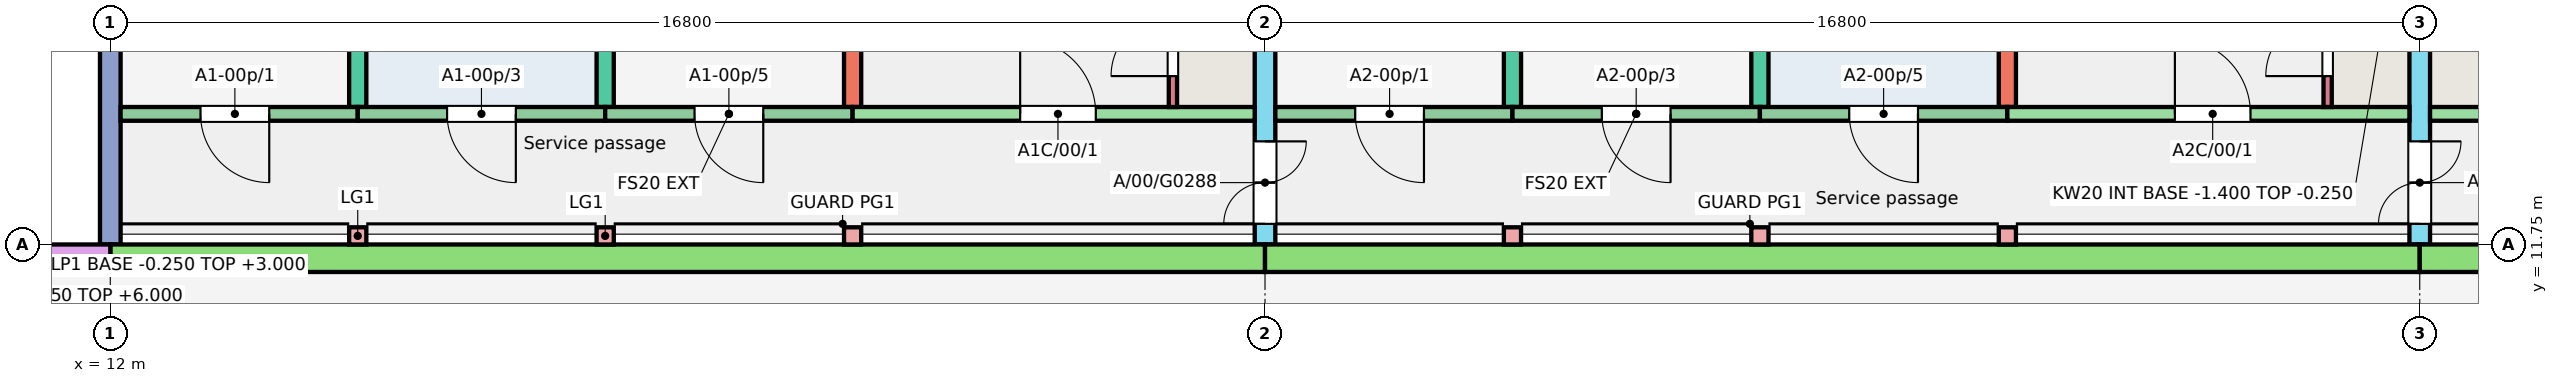
"""IFC4 building model, lengths in metres.
Left out: names, types, materials, properties, quantities, classifications, styles, units other than length and angle.
Written with IfcOpenShell. Run it as: python <this file> out.ifc"""

import sys

from ifc_helpers import new_model, si_unit, direction, frame, frame_2d, origin, origin_2d, place, context, subcontext, project, spatial, rectangle, extrude, element, fill, save


model = new_model("IFC4")
c1 = context("Model", 3, precision=1e-05, world=origin(), true_north=direction((0.0, 1.0)))
c2 = subcontext(c1, "Body", "Model", "MODEL_VIEW")
j1 = project(units=[si_unit("LENGTHUNIT", "METRE"), si_unit("PLANEANGLEUNIT", "RADIAN")], contexts=[c1])
p1 = place(None, origin())
s1 = spatial("IfcSite", under=j1, at=p1, CompositionType="ELEMENT")
p2 = place(p1, origin())
s2 = spatial("IfcBuilding", under=s1, at=p2, CompositionType="ELEMENT")
p3 = place(p2, origin())
s3 = spatial("IfcBuildingStorey", under=s2, at=p3, CompositionType="ELEMENT", Elevation=0.0)
p4 = place(p3, frame((12.0, 11.75, -0.25), z_axis=(0.0, 0.0, 1.0), x_axis=(0.0, 1.0, 0.0)))
e1 = element("IfcWall", 1, at=p4, inside=s3, PredefinedType="SHEAR", context=c2, shape_type="SweptSolid", body=[
    extrude(rectangle(XDim=11.0, YDim=0.3, at=frame_2d((5.5, 0.0))), origin(), (0.0, 0.0, 1.0), 3.25),
])
for number, where, z_axis, x_axis in (
    (2, (15.6, 13.75, -0.25), (0.0, 0.0, 1.0), (0.0, 1.0, 0.0)),
    (3, (19.2, 13.75, -0.25), (0.0, 0.0, 1.0), (0.0, 1.0, 0.0)),
    (4, (22.8, 13.75, -0.25), (0.0, 0.0, 1.0), (0.0, 1.0, 0.0)),
):
    element("IfcWall", number, at=place(p3, frame(where, z_axis=z_axis, x_axis=x_axis)), inside=s3, PredefinedType="SHEAR", context=c2, shape_type="SweptSolid", body=[
        extrude(rectangle(XDim=9.0, YDim=0.25, at=frame_2d((4.5, 0.0))), origin(), (0.0, 0.0, 1.0), 3.25),
    ])
p5 = place(p3, frame((28.8, 11.75, -0.25), z_axis=(0.0, 0.0, 1.0), x_axis=(0.0, 1.0, 0.0)))
e5 = element("IfcWall", 5, at=p5, inside=s3, PredefinedType="SHEAR", context=c2, shape_type="SweptSolid", body=[
    extrude(rectangle(XDim=11.0, YDim=0.3, at=frame_2d((5.5, 0.0))), origin(), (0.0, 0.0, 1.0), 3.25),
])
p6 = place(p5, frame((0.3, 0.0, 0.25)))
e6 = element("IfcOpeningElement", 6, at=p6, cuts=e5, PredefinedType="OPENING", context=c2, shape_type="SweptSolid", body=[
    extrude(rectangle(XDim=1.2, YDim=2.1, at=frame_2d((0.6, 1.05))), frame((0.0, 0.16, 0.0), z_axis=(0.0, -1.0, 0.0), x_axis=(1.0, 0.0, 0.0)), (0.0, 0.0, 1.0), 0.32),
])
for number, where, z_axis, x_axis in (
    (7, (32.4, 13.75, -0.25), (0.0, 0.0, 1.0), (0.0, 1.0, 0.0)),
    (8, (36.0, 13.75, -0.25), (0.0, 0.0, 1.0), (0.0, 1.0, 0.0)),
    (9, (39.6, 13.75, -0.25), (0.0, 0.0, 1.0), (0.0, 1.0, 0.0)),
):
    element("IfcWall", number, at=place(p3, frame(where, z_axis=z_axis, x_axis=x_axis)), inside=s3, PredefinedType="SHEAR", context=c2, shape_type="SweptSolid", body=[
        extrude(rectangle(XDim=9.0, YDim=0.25, at=frame_2d((4.5, 0.0))), origin(), (0.0, 0.0, 1.0), 3.25),
    ])
p7 = place(p3, frame((45.6, 11.75, -0.25), z_axis=(0.0, 0.0, 1.0), x_axis=(0.0, 1.0, 0.0)))
e10 = element("IfcWall", 10, at=p7, inside=s3, PredefinedType="SHEAR", context=c2, shape_type="SweptSolid", body=[
    extrude(rectangle(XDim=11.0, YDim=0.3, at=frame_2d((5.5, 0.0))), origin(), (0.0, 0.0, 1.0), 3.25),
])
p8 = place(p7, frame((0.3, 0.0, 0.25)))
e11 = element("IfcOpeningElement", 11, at=p8, cuts=e10, PredefinedType="OPENING", context=c2, shape_type="SweptSolid", body=[
    extrude(rectangle(XDim=1.2, YDim=2.1, at=frame_2d((0.6, 1.05))), frame((0.0, 0.16, 0.0), z_axis=(0.0, -1.0, 0.0), x_axis=(1.0, 0.0, 0.0)), (0.0, 0.0, 1.0), 0.32),
])
p9 = place(p3, frame((12.15, 13.65, -0.25), z_axis=(0.0, 0.0, 1.0), x_axis=(1.0, 0.0, 0.0)))
e12 = element("IfcWall", 12, at=p9, inside=s3, PredefinedType="SOLIDWALL", context=c2, shape_type="SweptSolid", body=[
    extrude(rectangle(XDim=3.45, YDim=0.2, at=frame_2d((1.725, 0.0))), origin(), (0.0, 0.0, 1.0), 3.25),
])
p10 = place(p9, frame((1.163, 0.0, 0.25)))
e13 = element("IfcOpeningElement", 13, at=p10, cuts=e12, PredefinedType="OPENING", context=c2, shape_type="SweptSolid", body=[
    extrude(rectangle(XDim=1.0, YDim=2.1, at=frame_2d((0.5, 1.05))), frame((0.0, 0.11, 0.0), z_axis=(0.0, -1.0, 0.0), x_axis=(1.0, 0.0, 0.0)), (0.0, 0.0, 1.0), 0.22),
])
p11 = place(p3, frame((15.6, 13.65, -0.25), z_axis=(0.0, 0.0, 1.0), x_axis=(1.0, 0.0, 0.0)))
e14 = element("IfcWall", 14, at=p11, inside=s3, PredefinedType="SOLIDWALL", context=c2, shape_type="SweptSolid", body=[
    extrude(rectangle(XDim=3.6, YDim=0.2, at=frame_2d((1.8, 0.0))), origin(), (0.0, 0.0, 1.0), 3.25),
])
p12 = place(p11, frame((1.3, 0.0, 0.25)))
e15 = element("IfcOpeningElement", 15, at=p12, cuts=e14, PredefinedType="OPENING", context=c2, shape_type="SweptSolid", body=[
    extrude(rectangle(XDim=1.0, YDim=2.1, at=frame_2d((0.5, 1.05))), frame((0.0, 0.11, 0.0), z_axis=(0.0, -1.0, 0.0), x_axis=(1.0, 0.0, 0.0)), (0.0, 0.0, 1.0), 0.22),
])
p13 = place(p3, frame((19.2, 13.65, -0.25), z_axis=(0.0, 0.0, 1.0), x_axis=(1.0, 0.0, 0.0)))
e16 = element("IfcWall", 16, at=p13, inside=s3, PredefinedType="SOLIDWALL", context=c2, shape_type="SweptSolid", body=[
    extrude(rectangle(XDim=3.6, YDim=0.2, at=frame_2d((1.8, 0.0))), origin(), (0.0, 0.0, 1.0), 3.25),
])
p14 = place(p13, frame((1.3, 0.0, 0.25)))
e17 = element("IfcOpeningElement", 17, at=p14, cuts=e16, PredefinedType="OPENING", context=c2, shape_type="SweptSolid", body=[
    extrude(rectangle(XDim=1.0, YDim=2.1, at=frame_2d((0.5, 1.05))), frame((0.0, 0.11, 0.0), z_axis=(0.0, -1.0, 0.0), x_axis=(1.0, 0.0, 0.0)), (0.0, 0.0, 1.0), 0.22),
])
p15 = place(p3, frame((22.8, 13.65, -0.25), z_axis=(0.0, 0.0, 1.0), x_axis=(1.0, 0.0, 0.0)))
e18 = element("IfcWall", 18, at=p15, inside=s3, PredefinedType="SHEAR", context=c2, shape_type="SweptSolid", body=[
    extrude(rectangle(XDim=5.85, YDim=0.2, at=frame_2d((2.925, 0.0))), origin(), (0.0, 0.0, 1.0), 3.25),
])
p16 = place(p15, frame((2.438, 0.0, 0.25)))
e19 = element("IfcOpeningElement", 19, at=p16, cuts=e18, PredefinedType="OPENING", context=c2, shape_type="SweptSolid", body=[
    extrude(rectangle(XDim=1.1, YDim=2.1, at=frame_2d((0.55, 1.05))), frame((0.0, 0.11, 0.0), z_axis=(0.0, -1.0, 0.0), x_axis=(1.0, 0.0, 0.0)), (0.0, 0.0, 1.0), 0.22),
])
p17 = place(p3, frame((27.46, 13.75, -0.25), z_axis=(0.0, 0.0, 1.0), x_axis=(0.0, 1.0, 0.0)))
e20 = element("IfcWall", 20, at=p17, inside=s3, PredefinedType="SHEAR", context=c2, shape_type="SweptSolid", body=[
    extrude(rectangle(XDim=1.72, YDim=0.12, at=frame_2d((0.86, 0.0))), origin(), (0.0, 0.0, 1.0), 3.25),
])
p18 = place(p17, frame((0.45, 0.0, 0.25)))
e21 = element("IfcOpeningElement", 21, at=p18, cuts=e20, PredefinedType="OPENING", context=c2, shape_type="SweptSolid", body=[
    extrude(rectangle(XDim=0.9, YDim=2.1, at=frame_2d((0.45, 1.05))), frame((0.0, 0.07, 0.0), z_axis=(0.0, -1.0, 0.0), x_axis=(1.0, 0.0, 0.0)), (0.0, 0.0, 1.0), 0.14),
])
p19 = place(p3, frame((28.95, 13.65, -0.25), z_axis=(0.0, 0.0, 1.0), x_axis=(1.0, 0.0, 0.0)))
e22 = element("IfcWall", 22, at=p19, inside=s3, PredefinedType="SOLIDWALL", context=c2, shape_type="SweptSolid", body=[
    extrude(rectangle(XDim=3.45, YDim=0.2, at=frame_2d((1.725, 0.0))), origin(), (0.0, 0.0, 1.0), 3.25),
])
p20 = place(p19, frame((1.163, 0.0, 0.25)))
e23 = element("IfcOpeningElement", 23, at=p20, cuts=e22, PredefinedType="OPENING", context=c2, shape_type="SweptSolid", body=[
    extrude(rectangle(XDim=1.0, YDim=2.1, at=frame_2d((0.5, 1.05))), frame((0.0, 0.11, 0.0), z_axis=(0.0, -1.0, 0.0), x_axis=(1.0, 0.0, 0.0)), (0.0, 0.0, 1.0), 0.22),
])
p21 = place(p3, frame((32.4, 13.65, -0.25), z_axis=(0.0, 0.0, 1.0), x_axis=(1.0, 0.0, 0.0)))
e24 = element("IfcWall", 24, at=p21, inside=s3, PredefinedType="SOLIDWALL", context=c2, shape_type="SweptSolid", body=[
    extrude(rectangle(XDim=3.6, YDim=0.2, at=frame_2d((1.8, 0.0))), origin(), (0.0, 0.0, 1.0), 3.25),
])
p22 = place(p21, frame((1.3, 0.0, 0.25)))
e25 = element("IfcOpeningElement", 25, at=p22, cuts=e24, PredefinedType="OPENING", context=c2, shape_type="SweptSolid", body=[
    extrude(rectangle(XDim=1.0, YDim=2.1, at=frame_2d((0.5, 1.05))), frame((0.0, 0.11, 0.0), z_axis=(0.0, -1.0, 0.0), x_axis=(1.0, 0.0, 0.0)), (0.0, 0.0, 1.0), 0.22),
])
p23 = place(p3, frame((36.0, 13.65, -0.25), z_axis=(0.0, 0.0, 1.0), x_axis=(1.0, 0.0, 0.0)))
e26 = element("IfcWall", 26, at=p23, inside=s3, PredefinedType="SOLIDWALL", context=c2, shape_type="SweptSolid", body=[
    extrude(rectangle(XDim=3.6, YDim=0.2, at=frame_2d((1.8, 0.0))), origin(), (0.0, 0.0, 1.0), 3.25),
])
p24 = place(p23, frame((1.3, 0.0, 0.25)))
e27 = element("IfcOpeningElement", 27, at=p24, cuts=e26, PredefinedType="OPENING", context=c2, shape_type="SweptSolid", body=[
    extrude(rectangle(XDim=1.0, YDim=2.1, at=frame_2d((0.5, 1.05))), frame((0.0, 0.11, 0.0), z_axis=(0.0, -1.0, 0.0), x_axis=(1.0, 0.0, 0.0)), (0.0, 0.0, 1.0), 0.22),
])
p25 = place(p3, frame((39.6, 13.65, -0.25), z_axis=(0.0, 0.0, 1.0), x_axis=(1.0, 0.0, 0.0)))
e28 = element("IfcWall", 28, at=p25, inside=s3, PredefinedType="SHEAR", context=c2, shape_type="SweptSolid", body=[
    extrude(rectangle(XDim=5.85, YDim=0.2, at=frame_2d((2.925, 0.0))), origin(), (0.0, 0.0, 1.0), 3.25),
])
p26 = place(p25, frame((2.438, 0.0, 0.25)))
e29 = element("IfcOpeningElement", 29, at=p26, cuts=e28, PredefinedType="OPENING", context=c2, shape_type="SweptSolid", body=[
    extrude(rectangle(XDim=1.1, YDim=2.1, at=frame_2d((0.55, 1.05))), frame((0.0, 0.11, 0.0), z_axis=(0.0, -1.0, 0.0), x_axis=(1.0, 0.0, 0.0)), (0.0, 0.0, 1.0), 0.22),
])
p27 = place(p3, frame((44.26, 13.75, -0.25), z_axis=(0.0, 0.0, 1.0), x_axis=(0.0, 1.0, 0.0)))
e30 = element("IfcWall", 30, at=p27, inside=s3, PredefinedType="SHEAR", context=c2, shape_type="SweptSolid", body=[
    extrude(rectangle(XDim=1.72, YDim=0.12, at=frame_2d((0.86, 0.0))), origin(), (0.0, 0.0, 1.0), 3.25),
])
p28 = place(p27, frame((0.45, 0.0, 0.25)))
e31 = element("IfcOpeningElement", 31, at=p28, cuts=e30, PredefinedType="OPENING", context=c2, shape_type="SweptSolid", body=[
    extrude(rectangle(XDim=0.9, YDim=2.1, at=frame_2d((0.45, 1.05))), frame((0.0, 0.07, 0.0), z_axis=(0.0, -1.0, 0.0), x_axis=(1.0, 0.0, 0.0)), (0.0, 0.0, 1.0), 0.14),
])
p29 = place(p3, frame((45.75, 13.65, -0.25), z_axis=(0.0, 0.0, 1.0), x_axis=(1.0, 0.0, 0.0)))
e32 = element("IfcWall", 32, at=p29, inside=s3, PredefinedType="SHEAR", context=c2, shape_type="SweptSolid", body=[
    extrude(rectangle(XDim=5.85, YDim=0.2, at=frame_2d((2.925, 0.0))), origin(), (0.0, 0.0, 1.0), 3.25),
])
p30 = place(p29, frame((2.312, 0.0, 0.25)))
e33 = element("IfcOpeningElement", 33, at=p30, cuts=e32, PredefinedType="OPENING", context=c2, shape_type="SweptSolid", body=[
    extrude(rectangle(XDim=1.1, YDim=2.1, at=frame_2d((0.55, 1.05))), frame((0.0, 0.11, 0.0), z_axis=(0.0, -1.0, 0.0), x_axis=(1.0, 0.0, 0.0)), (0.0, 0.0, 1.0), 0.22),
])
for number, where, z_axis, x_axis in (
    (34, (15.6, 11.875, -0.25), (0.0, 0.0, 1.0), (1.0, 0.0, 0.0)),
    (35, (19.2, 11.875, -0.25), (0.0, 0.0, 1.0), (1.0, 0.0, 0.0)),
    (36, (22.8, 11.875, -0.25), (0.0, 0.0, 1.0), (1.0, 0.0, 0.0)),
    (37, (32.4, 11.875, -0.25), (0.0, 0.0, 1.0), (1.0, 0.0, 0.0)),
    (38, (36.0, 11.875, -0.25), (0.0, 0.0, 1.0), (1.0, 0.0, 0.0)),
    (39, (39.6, 11.875, -0.25), (0.0, 0.0, 1.0), (1.0, 0.0, 0.0)),
):
    element("IfcColumn", number, at=place(p3, frame(where, z_axis=z_axis, x_axis=x_axis)), inside=s3, PredefinedType="COLUMN", context=c2, shape_type="SweptSolid", body=[
        extrude(rectangle(XDim=0.25, YDim=0.25, at=origin_2d()), origin(), (0.0, 0.0, 1.0), 3.25),
    ])
for number, where, z_axis, x_axis in (
    (40, (12.0, 11.55, -0.25), (0.0, 0.0, 1.0), (1.0, 0.0, 0.0)),
    (41, (28.8, 11.55, -0.25), (0.0, 0.0, 1.0), (1.0, 0.0, 0.0)),
):
    element("IfcWall", number, at=place(p3, frame(where, z_axis=z_axis, x_axis=x_axis)), inside=s3, PredefinedType="SOLIDWALL", context=c2, shape_type="SweptSolid", body=[
        extrude(rectangle(XDim=16.8, YDim=0.4, at=frame_2d((8.4, 0.0))), origin(), (0.0, 0.0, 1.0), 3.25),
    ])
p31 = place(p3, frame((45.6, 11.55, -0.25), z_axis=(0.0, 0.0, 1.0), x_axis=(1.0, 0.0, 0.0)))
e42 = element("IfcWall", 42, at=p31, inside=s3, PredefinedType="SOLIDWALL", context=c2, shape_type="SweptSolid", body=[
    extrude(rectangle(XDim=16.8, YDim=0.4, at=frame_2d((8.4, 0.0))), origin(), (0.0, 0.0, 1.0), 3.25),
])
p32 = place(p3, frame((9.7, 11.55, -0.25), z_axis=(0.0, 0.0, 1.0), x_axis=(1.0, 0.0, 0.0)))
e43 = element("IfcWall", 43, at=p32, inside=s3, PredefinedType="SOLIDWALL", context=c2, shape_type="SweptSolid", body=[
    extrude(rectangle(XDim=2.3, YDim=0.4, at=frame_2d((1.15, 0.0))), origin(), (0.0, 0.0, 1.0), 6.25),
])
p33 = place(p10, origin())
e44 = element("IfcDoor", 44, at=p33, inside=s3, OperationType="SINGLE_SWING_RIGHT", PredefinedType="DOOR", context=c2, shape_type="SweptSolid", body=[
    extrude(rectangle(XDim=1.0, YDim=2.1, at=frame_2d((0.5, 1.05))), frame((0.0, 0.025, 0.0), z_axis=(0.0, -1.0, 0.0), x_axis=(1.0, 0.0, 0.0)), (0.0, 0.0, 1.0), 0.05),
])
fill(e13, e44)
p34 = place(p12, origin())
e45 = element("IfcDoor", 45, at=p34, inside=s3, OperationType="SINGLE_SWING_RIGHT", PredefinedType="DOOR", context=c2, shape_type="SweptSolid", body=[
    extrude(rectangle(XDim=1.0, YDim=2.1, at=frame_2d((0.5, 1.05))), frame((0.0, 0.025, 0.0), z_axis=(0.0, -1.0, 0.0), x_axis=(1.0, 0.0, 0.0)), (0.0, 0.0, 1.0), 0.05),
])
fill(e15, e45)
p35 = place(p14, origin())
e46 = element("IfcDoor", 46, at=p35, inside=s3, OperationType="SINGLE_SWING_RIGHT", PredefinedType="DOOR", context=c2, shape_type="SweptSolid", body=[
    extrude(rectangle(XDim=1.0, YDim=2.1, at=frame_2d((0.5, 1.05))), frame((0.0, 0.025, 0.0), z_axis=(0.0, -1.0, 0.0), x_axis=(1.0, 0.0, 0.0)), (0.0, 0.0, 1.0), 0.05),
])
fill(e17, e46)
p36 = place(p20, origin())
e47 = element("IfcDoor", 47, at=p36, inside=s3, OperationType="SINGLE_SWING_RIGHT", PredefinedType="DOOR", context=c2, shape_type="SweptSolid", body=[
    extrude(rectangle(XDim=1.0, YDim=2.1, at=frame_2d((0.5, 1.05))), frame((0.0, 0.025, 0.0), z_axis=(0.0, -1.0, 0.0), x_axis=(1.0, 0.0, 0.0)), (0.0, 0.0, 1.0), 0.05),
])
fill(e23, e47)
p37 = place(p22, origin())
e48 = element("IfcDoor", 48, at=p37, inside=s3, OperationType="SINGLE_SWING_RIGHT", PredefinedType="DOOR", context=c2, shape_type="SweptSolid", body=[
    extrude(rectangle(XDim=1.0, YDim=2.1, at=frame_2d((0.5, 1.05))), frame((0.0, 0.025, 0.0), z_axis=(0.0, -1.0, 0.0), x_axis=(1.0, 0.0, 0.0)), (0.0, 0.0, 1.0), 0.05),
])
fill(e25, e48)
p38 = place(p24, origin())
e49 = element("IfcDoor", 49, at=p38, inside=s3, OperationType="SINGLE_SWING_RIGHT", PredefinedType="DOOR", context=c2, shape_type="SweptSolid", body=[
    extrude(rectangle(XDim=1.0, YDim=2.1, at=frame_2d((0.5, 1.05))), frame((0.0, 0.025, 0.0), z_axis=(0.0, -1.0, 0.0), x_axis=(1.0, 0.0, 0.0)), (0.0, 0.0, 1.0), 0.05),
])
fill(e27, e49)
p39 = place(p16, origin())
e50 = element("IfcDoor", 50, at=p39, inside=s3, OperationType="SINGLE_SWING_LEFT", PredefinedType="DOOR", context=c2, shape_type="SweptSolid", body=[
    extrude(rectangle(XDim=1.1, YDim=2.1, at=frame_2d((0.55, 1.05))), frame((0.0, 0.025, 0.0), z_axis=(0.0, -1.0, 0.0), x_axis=(1.0, 0.0, 0.0)), (0.0, 0.0, 1.0), 0.05),
])
fill(e19, e50)
p40 = place(p18, origin())
e51 = element("IfcDoor", 51, at=p40, inside=s3, OperationType="SINGLE_SWING_LEFT", PredefinedType="DOOR", context=c2, shape_type="SweptSolid", body=[
    extrude(rectangle(XDim=0.9, YDim=2.1, at=frame_2d((0.45, 1.05))), frame((0.0, 0.025, 0.0), z_axis=(0.0, -1.0, 0.0), x_axis=(1.0, 0.0, 0.0)), (0.0, 0.0, 1.0), 0.05),
])
fill(e21, e51)
p41 = place(p26, origin())
e52 = element("IfcDoor", 52, at=p41, inside=s3, OperationType="SINGLE_SWING_LEFT", PredefinedType="DOOR", context=c2, shape_type="SweptSolid", body=[
    extrude(rectangle(XDim=1.1, YDim=2.1, at=frame_2d((0.55, 1.05))), frame((0.0, 0.025, 0.0), z_axis=(0.0, -1.0, 0.0), x_axis=(1.0, 0.0, 0.0)), (0.0, 0.0, 1.0), 0.05),
])
fill(e29, e52)
p42 = place(p28, origin())
e53 = element("IfcDoor", 53, at=p42, inside=s3, OperationType="SINGLE_SWING_LEFT", PredefinedType="DOOR", context=c2, shape_type="SweptSolid", body=[
    extrude(rectangle(XDim=0.9, YDim=2.1, at=frame_2d((0.45, 1.05))), frame((0.0, 0.025, 0.0), z_axis=(0.0, -1.0, 0.0), x_axis=(1.0, 0.0, 0.0)), (0.0, 0.0, 1.0), 0.05),
])
fill(e31, e53)
p43 = place(p6, origin())
e54 = element("IfcDoor", 54, at=p43, inside=s3, OperationType="DOUBLE_DOOR_SINGLE_SWING", PredefinedType="DOOR", context=c2, shape_type="SweptSolid", body=[
    extrude(rectangle(XDim=1.2, YDim=2.1, at=frame_2d((0.6, 1.05))), frame((0.0, 0.025, 0.0), z_axis=(0.0, -1.0, 0.0), x_axis=(1.0, 0.0, 0.0)), (0.0, 0.0, 1.0), 0.05),
])
fill(e6, e54)
p44 = place(p8, origin())
e55 = element("IfcDoor", 55, at=p44, inside=s3, OperationType="DOUBLE_DOOR_SINGLE_SWING", PredefinedType="DOOR", context=c2, shape_type="SweptSolid", body=[
    extrude(rectangle(XDim=1.2, YDim=2.1, at=frame_2d((0.6, 1.05))), frame((0.0, 0.025, 0.0), z_axis=(0.0, -1.0, 0.0), x_axis=(1.0, 0.0, 0.0)), (0.0, 0.0, 1.0), 0.05),
])
fill(e11, e55)
save(model, sys.argv[1])
